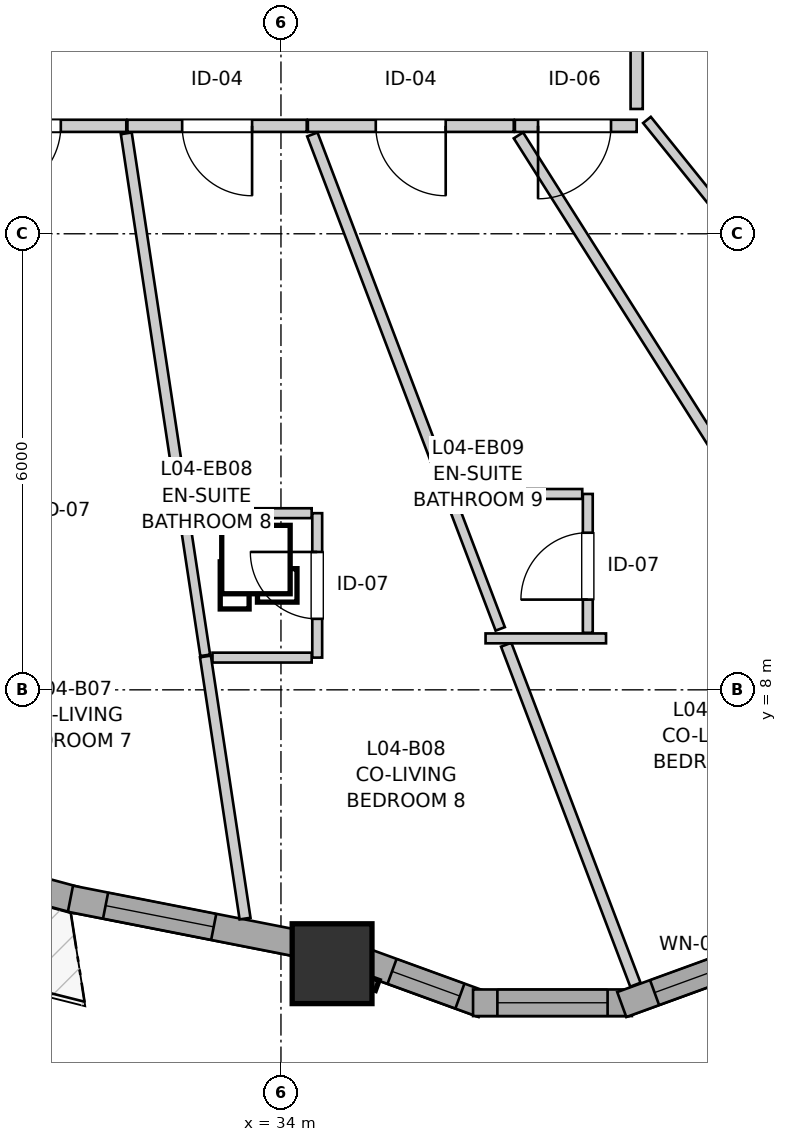
"""IFC4 building model, lengths in metres.
Left out: names, types, materials, properties, quantities, classifications, styles, units other than length and angle.
Written with IfcOpenShell. Run it as: python <this file> out.ifc"""

import sys

from ifc_helpers import new_model, si_unit, direction, frame, frame_2d, origin, origin_2d, place, context, subcontext, project, spatial, rectangle, extrude, source, transform, mapped, element, fill, save


model = new_model("IFC4")
c1 = context("Model", 3, precision=1e-05, world=origin(), true_north=direction((0.0, 1.0)))
c2 = subcontext(c1, "Body", "Model", "MODEL_VIEW")
j1 = project(units=[si_unit("LENGTHUNIT", "METRE"), si_unit("PLANEANGLEUNIT", "RADIAN")], contexts=[c1])
p1 = place(None, origin())
s1 = spatial("IfcSite", under=j1, at=p1, CompositionType="ELEMENT")
p2 = place(p1, origin())
s2 = spatial("IfcBuilding", under=s1, at=p2, CompositionType="ELEMENT")
p3 = place(p2, frame((0.0, 0.0, 17.4)))
s3 = spatial("IfcBuildingStorey", under=s2, at=p3, CompositionType="ELEMENT", Elevation=17.4)
m1 = source(origin(), c2, "Body", "SweptSolid", [
    extrude(rectangle(XDim=1.05, YDim=1.05, at=origin_2d()), origin(), (0.0, 0.0, 1.0), 2.94),
])
p4 = place(p3, frame((34.673, 4.397, 0.0), z_axis=(0.0, 0.0, 1.0), x_axis=(1.0, 0.0, 0.0)))
e1 = element("IfcColumn", 1, at=p4, inside=s3, PredefinedType="COLUMN", context=c2, shape_type="MappedRepresentation", body=[
    mapped(m1, transform((0.0, 0.0, 0.0), x_axis=(1.0, 0.0, 0.0), y_axis=(0.0, 1.0, 0.0), z_axis=(0.0, 0.0, 1.0), scale=1.0)),
])
p5 = place(p3, frame((27.986, 6.131, 0.0), z_axis=(0.0, 0.0, 1.0), x_axis=(0.96546113776, -0.2605471003, 0.0)))
e2 = element("IfcWall", 2, at=p5, inside=s3, PredefinedType="SOLIDWALL", context=c2, shape_type="SweptSolid", body=[
    extrude(rectangle(XDim=3.449, YDim=0.35, at=frame_2d((1.725, 0.0))), origin(), (0.0, 0.0, 1.0), 2.42),
])
p6 = place(p5, frame((1.179, 0.0, 0.82)))
e3 = element("IfcOpeningElement", 3, at=p6, cuts=e2, PredefinedType="OPENING", context=c2, shape_type="SweptSolid", body=[
    extrude(rectangle(XDim=1.45, YDim=1.25, at=frame_2d((0.725, 0.625))), frame((0.0, 0.185, 0.0), z_axis=(0.0, -1.0, 0.0), x_axis=(1.0, 0.0, 0.0)), (0.0, 0.0, 1.0), 0.37),
])
p7 = place(p3, frame((31.23, 5.252, 0.0), z_axis=(0.0, 0.0, 1.0), x_axis=(0.981232542219, -0.192828156892, 0.0)))
e4 = element("IfcWall", 4, at=p7, inside=s3, PredefinedType="SOLIDWALL", context=c2, shape_type="SweptSolid", body=[
    extrude(rectangle(XDim=3.242, YDim=0.35, at=frame_2d((1.621, 0.0))), origin(), (0.0, 0.0, 1.0), 2.42),
])
p8 = place(p7, frame((0.471, 0.0, 0.82)))
e5 = element("IfcOpeningElement", 5, at=p8, cuts=e4, PredefinedType="OPENING", context=c2, shape_type="SweptSolid", body=[
    extrude(rectangle(XDim=1.45, YDim=1.25, at=frame_2d((0.725, 0.625))), frame((0.0, 0.185, 0.0), z_axis=(0.0, -1.0, 0.0), x_axis=(1.0, 0.0, 0.0)), (0.0, 0.0, 1.0), 0.37),
])
p9 = place(p3, frame((35.014, 4.459, 0.0), z_axis=(0.0, 0.0, 1.0), x_axis=(0.939720171257, -0.341944439541, 0.0)))
e6 = element("IfcWall", 6, at=p9, inside=s3, PredefinedType="SOLIDWALL", context=c2, shape_type="SweptSolid", body=[
    extrude(rectangle(XDim=1.752, YDim=0.35, at=frame_2d((0.876, 0.0))), origin(), (0.0, 0.0, 1.0), 2.42),
])
p10 = place(p9, frame((0.476, 0.0, 0.82)))
e7 = element("IfcOpeningElement", 7, at=p10, cuts=e6, PredefinedType="OPENING", context=c2, shape_type="SweptSolid", body=[
    extrude(rectangle(XDim=0.95, YDim=1.35, at=frame_2d((0.475, 0.675))), frame((0.0, 0.185, 0.0), z_axis=(0.0, -1.0, 0.0), x_axis=(1.0, 0.0, 0.0)), (0.0, 0.0, 1.0), 0.37),
])
p11 = place(p3, frame((36.527, 3.883, 0.0), z_axis=(0.0, 0.0, 1.0), x_axis=(1.0, 0.0, 0.0)))
e8 = element("IfcWall", 8, at=p11, inside=s3, PredefinedType="SOLIDWALL", context=c2, shape_type="SweptSolid", body=[
    extrude(rectangle(XDim=2.09, YDim=0.35, at=frame_2d((1.045, 0.0))), origin(), (0.0, 0.0, 1.0), 2.42),
])
p12 = place(p11, frame((0.32, 0.0, 0.82)))
e9 = element("IfcOpeningElement", 9, at=p12, cuts=e8, PredefinedType="OPENING", context=c2, shape_type="SweptSolid", body=[
    extrude(rectangle(XDim=1.45, YDim=1.25, at=frame_2d((0.725, 0.625))), frame((0.0, 0.185, 0.0), z_axis=(0.0, -1.0, 0.0), x_axis=(1.0, 0.0, 0.0)), (0.0, 0.0, 1.0), 0.37),
])
p13 = place(p3, frame((38.484, 3.86, 0.0), z_axis=(0.0, 0.0, 1.0), x_axis=(0.939711556618, 0.341968113072, 0.0)))
e10 = element("IfcWall", 10, at=p13, inside=s3, PredefinedType="SOLIDWALL", context=c2, shape_type="SweptSolid", body=[
    extrude(rectangle(XDim=2.09, YDim=0.35, at=frame_2d((1.045, 0.0))), origin(), (0.0, 0.0, 1.0), 2.42),
])
p14 = place(p13, frame((0.459, 0.0, 0.82)))
e11 = element("IfcOpeningElement", 11, at=p14, cuts=e10, PredefinedType="OPENING", context=c2, shape_type="SweptSolid", body=[
    extrude(rectangle(XDim=1.35, YDim=1.45, at=frame_2d((0.675, 0.725))), frame((0.0, 0.185, 0.0), z_axis=(0.0, -1.0, 0.0), x_axis=(1.0, 0.0, 0.0)), (0.0, 0.0, 1.0), 0.37),
])
p15 = place(p3, frame((37.063, 15.42, 0.0), z_axis=(0.0, 0.0, 1.0), x_axis=(-1.0, 0.0, 0.0)))
e12 = element("IfcWall", 12, at=p15, inside=s3, PredefinedType="PARTITIONING", context=c2, shape_type="SweptSolid", body=[
    extrude(rectangle(XDim=2.709, YDim=0.16, at=frame_2d((1.354, 0.0))), origin(), (0.0, 0.0, 1.0), 2.94),
])
p16 = place(p15, frame((0.896, 0.0, 0.0)))
e13 = element("IfcOpeningElement", 13, at=p16, cuts=e12, PredefinedType="OPENING", context=c2, shape_type="SweptSolid", body=[
    extrude(rectangle(XDim=0.92, YDim=2.1, at=frame_2d((0.46, 1.05))), frame((0.0, 0.09, 0.0), z_axis=(0.0, -1.0, 0.0), x_axis=(1.0, 0.0, 0.0)), (0.0, 0.0, 1.0), 0.18),
])
p17 = place(p3, frame((31.965, 15.42, 0.0), z_axis=(0.0, 0.0, 1.0), x_axis=(-1.0, 0.0, 0.0)))
e14 = element("IfcWall", 14, at=p17, inside=s3, PredefinedType="PARTITIONING", context=c2, shape_type="SweptSolid", body=[
    extrude(rectangle(XDim=2.598, YDim=0.16, at=frame_2d((1.299, 0.0))), origin(), (0.0, 0.0, 1.0), 2.94),
])
p18 = place(p17, frame((0.862, 0.0, 0.0)))
e15 = element("IfcOpeningElement", 15, at=p18, cuts=e14, PredefinedType="OPENING", context=c2, shape_type="SweptSolid", body=[
    extrude(rectangle(XDim=0.92, YDim=2.1, at=frame_2d((0.46, 1.05))), frame((0.0, 0.09, 0.0), z_axis=(0.0, -1.0, 0.0), x_axis=(1.0, 0.0, 0.0)), (0.0, 0.0, 1.0), 0.18),
])
p19 = place(p3, frame((38.68, 18.147, 0.0), z_axis=(0.0, 0.0, 1.0), x_axis=(0.0, -1.0, 0.0)))
e16 = element("IfcWall", 16, at=p19, inside=s3, PredefinedType="PARTITIONING", context=c2, shape_type="SweptSolid", body=[
    extrude(rectangle(XDim=2.505, YDim=0.16, at=frame_2d((1.252, 0.0))), origin(), (0.0, 0.0, 1.0), 2.94),
])
p20 = place(p19, frame((0.748, 0.0, 0.0)))
e17 = element("IfcOpeningElement", 17, at=p20, cuts=e16, PredefinedType="OPENING", context=c2, shape_type="SweptSolid", body=[
    extrude(rectangle(XDim=0.95, YDim=2.1, at=frame_2d((0.475, 1.05))), frame((0.0, 0.09, 0.0), z_axis=(0.0, -1.0, 0.0), x_axis=(1.0, 0.0, 0.0)), (0.0, 0.0, 1.0), 0.18),
])
p21 = place(p3, frame((34.339, 15.42, 0.0), z_axis=(0.0, 0.0, 1.0), x_axis=(-1.0, 0.0, 0.0)))
e18 = element("IfcWall", 18, at=p21, inside=s3, PredefinedType="PARTITIONING", context=c2, shape_type="SweptSolid", body=[
    extrude(rectangle(XDim=2.359, YDim=0.16, at=frame_2d((1.18, 0.0))), origin(), (0.0, 0.0, 1.0), 2.94),
])
p22 = place(p21, frame((0.719, 0.0, 0.0)))
e19 = element("IfcOpeningElement", 19, at=p22, cuts=e18, PredefinedType="OPENING", context=c2, shape_type="SweptSolid", body=[
    extrude(rectangle(XDim=0.92, YDim=2.1, at=frame_2d((0.46, 1.05))), frame((0.0, 0.09, 0.0), z_axis=(0.0, -1.0, 0.0), x_axis=(1.0, 0.0, 0.0)), (0.0, 0.0, 1.0), 0.18),
])
p23 = place(p3, frame((34.477, 8.424, 0.0), z_axis=(0.0, 0.0, 1.0), x_axis=(0.0, 1.0, 0.0)))
e20 = element("IfcWall", 20, at=p23, inside=s3, PredefinedType="PARTITIONING", context=c2, shape_type="SweptSolid", body=[
    extrude(rectangle(XDim=1.9, YDim=0.13, at=frame_2d((0.95, 0.0))), origin(), (0.0, 0.0, 1.0), 2.94),
])
p24 = place(p23, frame((0.51, 0.0, 0.0)))
e21 = element("IfcOpeningElement", 21, at=p24, cuts=e20, PredefinedType="OPENING", context=c2, shape_type="SweptSolid", body=[
    extrude(rectangle(XDim=0.88, YDim=2.05, at=frame_2d((0.44, 1.025))), frame((0.0, 0.075, 0.0), z_axis=(0.0, -1.0, 0.0), x_axis=(1.0, 0.0, 0.0)), (0.0, 0.0, 1.0), 0.15),
])
p25 = place(p3, frame((38.037, 8.75, 0.0), z_axis=(0.0, 0.0, 1.0), x_axis=(0.0, 1.0, 0.0)))
e22 = element("IfcWall", 22, at=p25, inside=s3, PredefinedType="PARTITIONING", context=c2, shape_type="SweptSolid", body=[
    extrude(rectangle(XDim=1.827, YDim=0.13, at=frame_2d((0.914, 0.0))), origin(), (0.0, 0.0, 1.0), 2.94),
])
p26 = place(p25, frame((0.437, 0.0, 0.0)))
e23 = element("IfcOpeningElement", 23, at=p26, cuts=e22, PredefinedType="OPENING", context=c2, shape_type="SweptSolid", body=[
    extrude(rectangle(XDim=0.88, YDim=2.05, at=frame_2d((0.44, 1.025))), frame((0.0, 0.075, 0.0), z_axis=(0.0, -1.0, 0.0), x_axis=(1.0, 0.0, 0.0)), (0.0, 0.0, 1.0), 0.15),
])
p27 = place(p3, frame((38.68, 15.42, 0.0), z_axis=(0.0, 0.0, 1.0), x_axis=(-1.0, 0.0, 0.0)))
e24 = element("IfcWall", 24, at=p27, inside=s3, PredefinedType="PARTITIONING", context=c2, shape_type="SweptSolid", body=[
    extrude(rectangle(XDim=1.602, YDim=0.16, at=frame_2d((0.801, 0.0))), origin(), (0.0, 0.0, 1.0), 2.94),
])
p28 = place(p27, frame((0.337, 0.0, 0.0)))
e25 = element("IfcOpeningElement", 25, at=p28, cuts=e24, PredefinedType="OPENING", context=c2, shape_type="SweptSolid", body=[
    extrude(rectangle(XDim=0.96, YDim=2.1, at=frame_2d((0.48, 1.05))), frame((0.0, 0.09, 0.0), z_axis=(0.0, -1.0, 0.0), x_axis=(1.0, 0.0, 0.0)), (0.0, 0.0, 1.0), 0.18),
])
p29 = place(p3, frame((37.125, 15.294, 0.0), z_axis=(0.0, 0.0, 1.0), x_axis=(0.534743765269, -0.845014263492, 0.0)))
e26 = element("IfcWall", 26, at=p29, inside=s3, PredefinedType="PARTITIONING", context=c2, shape_type="SweptSolid", body=[
    extrude(rectangle(XDim=9.797, YDim=0.145, at=frame_2d((4.899, 0.0))), origin(), (0.0, 0.0, 1.0), 2.94),
])
p30 = place(p3, frame((38.81, 18.061, 0.0), z_axis=(0.0, 0.0, 1.0), x_axis=(0.729196389153, -0.684304483433, 0.0)))
e27 = element("IfcWall", 27, at=p30, inside=s3, PredefinedType="PARTITIONING", context=c2, shape_type="SweptSolid", body=[
    extrude(rectangle(XDim=7.396, YDim=0.13, at=frame_2d((3.698, 0.0))), origin(), (0.0, 0.0, 1.0), 2.94),
])
p31 = place(p3, frame((38.816, 15.498, 0.0), z_axis=(0.0, 0.0, 1.0), x_axis=(0.627528755525, -0.778593386171, 0.0)))
e28 = element("IfcWall", 28, at=p31, inside=s3, PredefinedType="PARTITIONING", context=c2, shape_type="SweptSolid", body=[
    extrude(rectangle(XDim=6.998, YDim=0.13, at=frame_2d((3.499, 0.0))), origin(), (0.0, 0.0, 1.0), 2.94),
])
p32 = place(p3, frame((34.413, 15.307, 0.0), z_axis=(0.0, 0.0, 1.0), x_axis=(0.355171610573, -0.934801116304, 0.0)))
e29 = element("IfcWall", 29, at=p32, inside=s3, PredefinedType="PARTITIONING", context=c2, shape_type="SweptSolid", body=[
    extrude(rectangle(XDim=5.177, YDim=0.145, at=frame_2d((2.589, 0.0))), origin(), (0.0, 0.0, 1.0), 2.94),
])
p33 = place(p3, frame((31.965, 15.321, 0.0), z_axis=(0.0, 0.0, 1.0), x_axis=(0.149541437001, -0.988755459464, 0.0)))
e30 = element("IfcWall", 30, at=p33, inside=s3, PredefinedType="PARTITIONING", context=c2, shape_type="SweptSolid", body=[
    extrude(rectangle(XDim=5.069, YDim=0.145, at=frame_2d((2.535, 0.0))), origin(), (0.0, 0.0, 1.0), 2.94),
])
p34 = place(p3, frame((36.963, 8.594, 0.0), z_axis=(0.0, 0.0, 1.0), x_axis=(0.35524629266, -0.934772737916, 0.0)))
e31 = element("IfcWall", 31, at=p34, inside=s3, PredefinedType="PARTITIONING", context=c2, shape_type="SweptSolid", body=[
    extrude(rectangle(XDim=4.785, YDim=0.145, at=frame_2d((2.393, 0.0))), origin(), (0.0, 0.0, 1.0), 2.94),
])
p35 = place(p3, frame((33.006, 8.439, 0.0), z_axis=(0.0, 0.0, 1.0), x_axis=(0.149510938207, -0.988760071684, 0.0)))
e32 = element("IfcWall", 32, at=p35, inside=s3, PredefinedType="PARTITIONING", context=c2, shape_type="SweptSolid", body=[
    extrude(rectangle(XDim=3.488, YDim=0.145, at=frame_2d((1.744, 0.0))), origin(), (0.0, 0.0, 1.0), 2.94),
])
p36 = place(p3, frame((36.257, 10.453, 0.0), z_axis=(0.0, 0.0, 1.0), x_axis=(0.355345777079, -0.934734924303, 0.0)))
e33 = element("IfcWall", 33, at=p36, inside=s3, PredefinedType="PARTITIONING", context=c2, shape_type="SweptSolid", body=[
    extrude(rectangle(XDim=1.766, YDim=0.13, at=frame_2d((0.883, 0.0))), origin(), (0.0, 0.0, 1.0), 2.94),
])
p37 = place(p3, frame((32.725, 10.294, 0.0), z_axis=(0.0, 0.0, 1.0), x_axis=(0.149533379282, -0.988756678096, 0.0)))
e34 = element("IfcWall", 34, at=p37, inside=s3, PredefinedType="PARTITIONING", context=c2, shape_type="SweptSolid", body=[
    extrude(rectangle(XDim=1.861, YDim=0.13, at=frame_2d((0.931, 0.0))), origin(), (0.0, 0.0, 1.0), 2.94),
])
p38 = place(p3, frame((36.347, 10.577, 0.0), z_axis=(0.0, 0.0, 1.0), x_axis=(1.0, 0.0, 0.0)))
e35 = element("IfcWall", 35, at=p38, inside=s3, PredefinedType="PARTITIONING", context=c2, shape_type="SweptSolid", body=[
    extrude(rectangle(XDim=1.617, YDim=0.13, at=frame_2d((0.808, 0.0))), origin(), (0.0, 0.0, 1.0), 2.94),
])
p39 = place(p3, frame((32.812, 10.324, 0.0), z_axis=(0.0, 0.0, 1.0), x_axis=(1.0, 0.0, 0.0)))
e36 = element("IfcWall", 36, at=p39, inside=s3, PredefinedType="PARTITIONING", context=c2, shape_type="SweptSolid", body=[
    extrude(rectangle(XDim=1.592, YDim=0.13, at=frame_2d((0.796, 0.0))), origin(), (0.0, 0.0, 1.0), 2.94),
])
p40 = place(p3, frame((33.099, 8.424, 0.0), z_axis=(0.0, 0.0, 1.0), x_axis=(1.0, 0.0, 0.0)))
e37 = element("IfcWall", 37, at=p40, inside=s3, PredefinedType="PARTITIONING", context=c2, shape_type="SweptSolid", body=[
    extrude(rectangle(XDim=1.305, YDim=0.13, at=frame_2d((0.652, 0.0))), origin(), (0.0, 0.0, 1.0), 2.508),
])
p41 = place(p3, frame((36.692, 8.677, 0.0), z_axis=(0.0, 0.0, 1.0), x_axis=(1.0, 0.0, 0.0)))
e38 = element("IfcWall", 38, at=p41, inside=s3, PredefinedType="PARTITIONING", context=c2, shape_type="SweptSolid", body=[
    extrude(rectangle(XDim=1.585, YDim=0.13, at=frame_2d((0.792, 0.0))), origin(), (0.0, 0.0, 1.0), 2.94),
])
m2 = source(origin(), c2, "Body", "SweptSolid", [
    extrude(rectangle(XDim=1.45, YDim=1.25, at=frame_2d((0.725, 0.625))), frame((0.0, 0.03, 0.0), z_axis=(0.0, -1.0, 0.0), x_axis=(1.0, 0.0, 0.0)), (0.0, 0.0, 1.0), 0.06),
])
p42 = place(p8, origin())
e39 = element("IfcWindow", 39, at=p42, inside=s3, PartitioningType="SINGLE_PANEL", PredefinedType="WINDOW", context=c2, shape_type="MappedRepresentation", body=[
    mapped(m2, transform((0.0, 0.0, 0.0), x_axis=(1.0, 0.0, 0.0), y_axis=(0.0, 1.0, 0.0), z_axis=(0.0, 0.0, 1.0), scale=1.0)),
])
fill(e5, e39)
m3 = source(origin(), c2, "Body", "SweptSolid", [
    extrude(rectangle(XDim=0.95, YDim=1.35, at=frame_2d((0.475, 0.675))), frame((0.0, 0.03, 0.0), z_axis=(0.0, -1.0, 0.0), x_axis=(1.0, 0.0, 0.0)), (0.0, 0.0, 1.0), 0.06),
])
p43 = place(p10, origin())
e40 = element("IfcWindow", 40, at=p43, inside=s3, PartitioningType="SINGLE_PANEL", PredefinedType="WINDOW", context=c2, shape_type="MappedRepresentation", body=[
    mapped(m3, transform((0.0, 0.0, 0.0), x_axis=(1.0, 0.0, 0.0), y_axis=(0.0, 1.0, 0.0), z_axis=(0.0, 0.0, 1.0), scale=1.0)),
])
fill(e7, e40)
p44 = place(p12, origin())
e41 = element("IfcWindow", 41, at=p44, inside=s3, PartitioningType="SINGLE_PANEL", PredefinedType="WINDOW", context=c2, shape_type="MappedRepresentation", body=[
    mapped(m2, transform((0.0, 0.0, 0.0), x_axis=(1.0, 0.0, 0.0), y_axis=(0.0, 1.0, 0.0), z_axis=(0.0, 0.0, 1.0), scale=1.0)),
])
fill(e9, e41)
m4 = source(origin(), c2, "Body", "SweptSolid", [
    extrude(rectangle(XDim=1.35, YDim=1.45, at=frame_2d((0.675, 0.725))), frame((0.0, 0.03, 0.0), z_axis=(0.0, -1.0, 0.0), x_axis=(1.0, 0.0, 0.0)), (0.0, 0.0, 1.0), 0.06),
])
p45 = place(p14, origin())
e42 = element("IfcWindow", 42, at=p45, inside=s3, PartitioningType="SINGLE_PANEL", PredefinedType="WINDOW", context=c2, shape_type="MappedRepresentation", body=[
    mapped(m4, transform((0.0, 0.0, 0.0), x_axis=(1.0, 0.0, 0.0), y_axis=(0.0, 1.0, 0.0), z_axis=(0.0, 0.0, 1.0), scale=1.0)),
])
fill(e11, e42)
m5 = source(origin(), c2, "Body", "SweptSolid", [
    extrude(rectangle(XDim=0.92, YDim=2.1, at=frame_2d((0.46, 1.05))), frame((0.0, 0.025, 0.0), z_axis=(0.0, -1.0, 0.0), x_axis=(1.0, 0.0, 0.0)), (0.0, 0.0, 1.0), 0.05),
])
p46 = place(p16, origin())
e43 = element("IfcDoor", 43, at=p46, inside=s3, OperationType="SINGLE_SWING_LEFT", PredefinedType="DOOR", context=c2, shape_type="MappedRepresentation", body=[
    mapped(m5, transform((0.0, 0.0, 0.0), x_axis=(1.0, 0.0, 0.0), y_axis=(0.0, 1.0, 0.0), z_axis=(0.0, 0.0, 1.0), scale=1.0)),
])
fill(e13, e43)
p47 = place(p18, origin())
e44 = element("IfcDoor", 44, at=p47, inside=s3, OperationType="SINGLE_SWING_RIGHT", PredefinedType="DOOR", context=c2, shape_type="MappedRepresentation", body=[
    mapped(m5, transform((0.0, 0.0, 0.0), x_axis=(1.0, 0.0, 0.0), y_axis=(0.0, 1.0, 0.0), z_axis=(0.0, 0.0, 1.0), scale=1.0)),
])
fill(e15, e44)
p48 = place(p22, origin())
e45 = element("IfcDoor", 45, at=p48, inside=s3, OperationType="SINGLE_SWING_LEFT", PredefinedType="DOOR", context=c2, shape_type="MappedRepresentation", body=[
    mapped(m5, transform((0.0, 0.0, 0.0), x_axis=(1.0, 0.0, 0.0), y_axis=(0.0, 1.0, 0.0), z_axis=(0.0, 0.0, 1.0), scale=1.0)),
])
fill(e19, e45)
m6 = source(origin(), c2, "Body", "SweptSolid", [
    extrude(rectangle(XDim=0.88, YDim=2.05, at=frame_2d((0.44, 1.025))), frame((0.0, 0.025, 0.0), z_axis=(0.0, -1.0, 0.0), x_axis=(1.0, 0.0, 0.0)), (0.0, 0.0, 1.0), 0.05),
])
p49 = place(p24, origin())
e46 = element("IfcDoor", 46, at=p49, inside=s3, OperationType="SINGLE_SWING_RIGHT", PredefinedType="DOOR", context=c2, shape_type="MappedRepresentation", body=[
    mapped(m6, transform((0.0, 0.0, 0.0), x_axis=(1.0, 0.0, 0.0), y_axis=(0.0, 1.0, 0.0), z_axis=(0.0, 0.0, 1.0), scale=1.0)),
])
fill(e21, e46)
p50 = place(p26, origin())
e47 = element("IfcDoor", 47, at=p50, inside=s3, OperationType="SINGLE_SWING_LEFT", PredefinedType="DOOR", context=c2, shape_type="MappedRepresentation", body=[
    mapped(m6, transform((0.0, 0.0, 0.0), x_axis=(1.0, 0.0, 0.0), y_axis=(0.0, 1.0, 0.0), z_axis=(0.0, 0.0, 1.0), scale=1.0)),
])
fill(e23, e47)
m7 = source(origin(), c2, "Body", "SweptSolid", [
    extrude(rectangle(XDim=0.96, YDim=2.1, at=frame_2d((0.48, 1.05))), frame((0.0, 0.025, 0.0), z_axis=(0.0, -1.0, 0.0), x_axis=(1.0, 0.0, 0.0)), (0.0, 0.0, 1.0), 0.05),
])
p51 = place(p28, origin())
e48 = element("IfcDoor", 48, at=p51, inside=s3, OperationType="SINGLE_SWING_RIGHT", PredefinedType="DOOR", context=c2, shape_type="MappedRepresentation", body=[
    mapped(m7, transform((0.0, 0.0, 0.0), x_axis=(1.0, 0.0, 0.0), y_axis=(0.0, 1.0, 0.0), z_axis=(0.0, 0.0, 1.0), scale=1.0)),
])
fill(e25, e48)
save(model, sys.argv[1])
